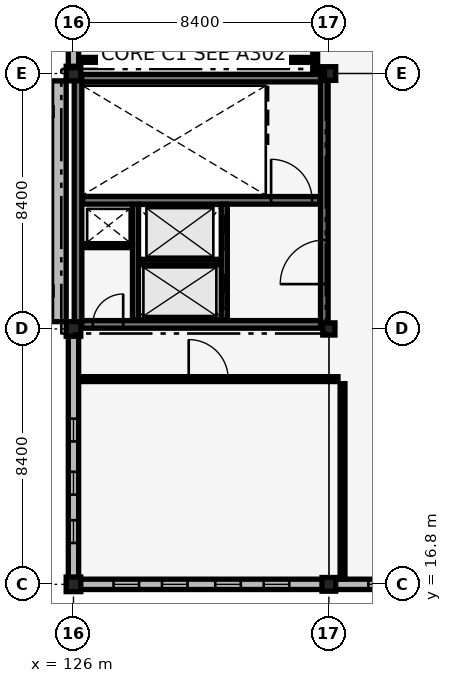
"""IFC4 building model, lengths in metres.
Left out: names, types, materials, properties, quantities, classifications, styles, units other than length and angle.
Written with IfcOpenShell. Run it as: python <this file> out.ifc"""

import sys

from ifc_helpers import new_model, si_unit, direction, frame, frame_2d, origin, origin_2d, place, context, subcontext, project, spatial, rectangle, extrude, element, fill, save


model = new_model("IFC4")
c1 = context("Model", 3, precision=1e-05, world=origin(), true_north=direction((0.0, 1.0)))
c2 = subcontext(c1, "Body", "Model", "MODEL_VIEW")
j1 = project(units=[si_unit("LENGTHUNIT", "METRE"), si_unit("PLANEANGLEUNIT", "RADIAN")], contexts=[c1])
p1 = place(None, origin())
s1 = spatial("IfcSite", under=j1, at=p1, CompositionType="ELEMENT")
p2 = place(p1, origin())
s2 = spatial("IfcBuilding", under=s1, at=p2, CompositionType="ELEMENT")
p3 = place(p2, frame((0.0, 0.0, 26.18)))
s3 = spatial("IfcBuildingStorey", under=s2, at=p3, CompositionType="ELEMENT", Elevation=26.18)
p4 = place(p3, frame((126.15, 25.35, 0.0), z_axis=(0.0, 0.0, 1.0), x_axis=(1.0, 0.0, 0.0)))
e1 = element("IfcWall", 1, at=p4, inside=s3, PredefinedType="SHEAR", context=c2, shape_type="SweptSolid", body=[
    extrude(rectangle(XDim=8.1, YDim=0.25, at=frame_2d((4.05, 0.0))), origin(), (0.0, 0.0, 1.0), 3.84),
])
p5 = place(p4, frame((0.485, 0.0, 0.0)))
e2 = element("IfcOpeningElement", 2, at=p5, cuts=e1, PredefinedType="OPENING", context=c2, shape_type="SweptSolid", body=[
    extrude(rectangle(XDim=1.0, YDim=2.15, at=frame_2d((0.5, 1.075))), frame((0.0, 0.135, 0.0), z_axis=(0.0, -1.0, 0.0), x_axis=(1.0, 0.0, 0.0)), (0.0, 0.0, 1.0), 0.27),
])
p6 = place(p3, frame((126.15, 33.45, 0.0), z_axis=(0.0, 0.0, 1.0), x_axis=(1.0, 0.0, 0.0)))
e3 = element("IfcWall", 3, at=p6, inside=s3, PredefinedType="SHEAR", context=c2, shape_type="SweptSolid", body=[
    extrude(rectangle(XDim=8.1, YDim=0.25, at=frame_2d((4.05, 0.0))), origin(), (0.0, 0.0, 1.0), 3.84),
])
p7 = place(p3, frame((126.15, 25.35, 0.0), z_axis=(0.0, 0.0, 1.0), x_axis=(0.0, 1.0, 0.0)))
e4 = element("IfcWall", 4, at=p7, inside=s3, PredefinedType="SHEAR", context=c2, shape_type="SweptSolid", body=[
    extrude(rectangle(XDim=8.1, YDim=0.25, at=frame_2d((4.05, 0.0))), origin(), (0.0, 0.0, 1.0), 3.84),
])
p8 = place(p3, frame((134.25, 25.35, 0.0), z_axis=(0.0, 0.0, 1.0), x_axis=(0.0, 1.0, 0.0)))
e5 = element("IfcWall", 5, at=p8, inside=s3, PredefinedType="SHEAR", context=c2, shape_type="SweptSolid", body=[
    extrude(rectangle(XDim=8.1, YDim=0.25, at=frame_2d((4.05, 0.0))), origin(), (0.0, 0.0, 1.0), 3.84),
])
p9 = place(p8, frame((1.325, 0.0, 0.0)))
e6 = element("IfcOpeningElement", 6, at=p9, cuts=e5, PredefinedType="OPENING", context=c2, shape_type="SweptSolid", body=[
    extrude(rectangle(XDim=1.45, YDim=2.15, at=frame_2d((0.725, 1.075))), frame((0.0, 0.135, 0.0), z_axis=(0.0, -1.0, 0.0), x_axis=(1.0, 0.0, 0.0)), (0.0, 0.0, 1.0), 0.27),
])
p10 = place(p3, frame((126.3, 29.43, 0.0), z_axis=(0.0, 0.0, 1.0), x_axis=(1.0, 0.0, 0.0)))
e7 = element("IfcWall", 7, at=p10, inside=s3, PredefinedType="SHEAR", context=c2, shape_type="SweptSolid", body=[
    extrude(rectangle(XDim=7.8, YDim=0.25, at=frame_2d((3.9, 0.0))), origin(), (0.0, 0.0, 1.0), 3.84),
])
p11 = place(p10, frame((6.2, 0.0, 0.0)))
e8 = element("IfcOpeningElement", 8, at=p11, cuts=e7, PredefinedType="OPENING", context=c2, shape_type="SweptSolid", body=[
    extrude(rectangle(XDim=1.35, YDim=2.15, at=frame_2d((0.675, 1.075))), frame((0.0, 0.135, 0.0), z_axis=(0.0, -1.0, 0.0), x_axis=(1.0, 0.0, 0.0)), (0.0, 0.0, 1.0), 0.27),
])
for number, where, z_axis, x_axis in (
    (9, (126.0, 16.8, 0.0), (0.0, 0.0, 1.0), (1.0, 0.0, 0.0)),
    (10, (126.0, 25.2, 0.0), (0.0, 0.0, 1.0), (1.0, 0.0, 0.0)),
    (11, (126.0, 33.6, 0.0), (0.0, 0.0, 1.0), (1.0, 0.0, 0.0)),
):
    element("IfcColumn", number, at=place(p3, frame(where, z_axis=z_axis, x_axis=x_axis)), inside=s3, PredefinedType="COLUMN", context=c2, shape_type="SweptSolid", body=[
        extrude(rectangle(XDim=0.48, YDim=0.48, at=origin_2d()), origin(), (0.0, 0.0, 1.0), 3.84),
    ])
p12 = place(p3, frame((134.4, 16.8, 0.0), z_axis=(0.0, 0.0, 1.0), x_axis=(1.0, 0.0, 0.0)))
e12 = element("IfcColumn", 12, at=p12, inside=s3, PredefinedType="COLUMN", context=c2, shape_type="SweptSolid", body=[
    extrude(rectangle(XDim=0.45, YDim=0.45, at=origin_2d()), origin(), (0.0, 0.0, 1.0), 3.84),
])
p13 = place(p3, frame((134.4, 25.2, 0.0), z_axis=(0.0, 0.0, 1.0), x_axis=(1.0, 0.0, 0.0)))
e13 = element("IfcColumn", 13, at=p13, inside=s3, PredefinedType="COLUMN", context=c2, shape_type="SweptSolid", body=[
    extrude(rectangle(XDim=0.4, YDim=0.4, at=origin_2d()), origin(), (0.0, 0.0, 1.0), 3.84),
])
p14 = place(p3, frame((134.4, 33.6, 0.0), z_axis=(0.0, 0.0, 1.0), x_axis=(1.0, 0.0, 0.0)))
e14 = element("IfcColumn", 14, at=p14, inside=s3, PredefinedType="COLUMN", context=c2, shape_type="SweptSolid", body=[
    extrude(rectangle(XDim=0.45, YDim=0.45, at=origin_2d()), origin(), (0.0, 0.0, 1.0), 3.84),
])
p15 = place(p3, frame((126.225, 16.8, 0.0), z_axis=(0.0, 0.0, 1.0), x_axis=(1.0, 0.0, 0.0)))
e15 = element("IfcWall", 15, at=p15, inside=s3, PredefinedType="SOLIDWALL", context=c2, shape_type="SweptSolid", body=[
    extrude(rectangle(XDim=7.965, YDim=0.34, at=frame_2d((3.982, 0.0))), origin(), (0.0, 0.0, 1.0), 3.84),
])
p16 = place(p15, frame((1.093, 0.0, 0.75)))
e16 = element("IfcOpeningElement", 16, at=p16, cuts=e15, PredefinedType="OPENING", context=c2, shape_type="SweptSolid", body=[
    extrude(rectangle(XDim=0.84, YDim=2.85, at=frame_2d((0.42, 1.425))), frame((0.0, 0.18, 0.0), z_axis=(0.0, -1.0, 0.0), x_axis=(1.0, 0.0, 0.0)), (0.0, 0.0, 1.0), 0.36),
])
p17 = place(p15, frame((2.686, 0.0, 0.75)))
e17 = element("IfcOpeningElement", 17, at=p17, cuts=e15, PredefinedType="OPENING", context=c2, shape_type="SweptSolid", body=[
    extrude(rectangle(XDim=0.84, YDim=2.85, at=frame_2d((0.42, 1.425))), frame((0.0, 0.18, 0.0), z_axis=(0.0, -1.0, 0.0), x_axis=(1.0, 0.0, 0.0)), (0.0, 0.0, 1.0), 0.36),
])
p18 = place(p15, frame((4.439, 0.0, 0.75)))
e18 = element("IfcOpeningElement", 18, at=p18, cuts=e15, PredefinedType="OPENING", context=c2, shape_type="SweptSolid", body=[
    extrude(rectangle(XDim=0.84, YDim=2.85, at=frame_2d((0.42, 1.425))), frame((0.0, 0.18, 0.0), z_axis=(0.0, -1.0, 0.0), x_axis=(1.0, 0.0, 0.0)), (0.0, 0.0, 1.0), 0.36),
])
p19 = place(p15, frame((6.032, 0.0, 0.75)))
e19 = element("IfcOpeningElement", 19, at=p19, cuts=e15, PredefinedType="OPENING", context=c2, shape_type="SweptSolid", body=[
    extrude(rectangle(XDim=0.84, YDim=2.85, at=frame_2d((0.42, 1.425))), frame((0.0, 0.18, 0.0), z_axis=(0.0, -1.0, 0.0), x_axis=(1.0, 0.0, 0.0)), (0.0, 0.0, 1.0), 0.36),
])
p20 = place(p3, frame((126.0, 17.025, 0.0), z_axis=(0.0, 0.0, 1.0), x_axis=(0.0, 1.0, 0.0)))
e20 = element("IfcWall", 20, at=p20, inside=s3, PredefinedType="SOLIDWALL", context=c2, shape_type="SweptSolid", body=[
    extrude(rectangle(XDim=7.95, YDim=0.34, at=frame_2d((3.975, 0.0))), origin(), (0.0, 0.0, 1.0), 3.48),
])
p21 = place(p20, frame((1.135, 0.0, 0.75)))
e21 = element("IfcOpeningElement", 21, at=p21, cuts=e20, PredefinedType="OPENING", context=c2, shape_type="SweptSolid", body=[
    extrude(rectangle(XDim=0.75, YDim=2.1, at=frame_2d((0.375, 1.05))), frame((0.0, 0.18, 0.0), z_axis=(0.0, -1.0, 0.0), x_axis=(1.0, 0.0, 0.0)), (0.0, 0.0, 1.0), 0.36),
])
p22 = place(p20, frame((2.726, 0.0, 0.75)))
e22 = element("IfcOpeningElement", 22, at=p22, cuts=e20, PredefinedType="OPENING", context=c2, shape_type="SweptSolid", body=[
    extrude(rectangle(XDim=0.75, YDim=2.1, at=frame_2d((0.375, 1.05))), frame((0.0, 0.18, 0.0), z_axis=(0.0, -1.0, 0.0), x_axis=(1.0, 0.0, 0.0)), (0.0, 0.0, 1.0), 0.36),
])
p23 = place(p20, frame((4.475, 0.0, 0.75)))
e23 = element("IfcOpeningElement", 23, at=p23, cuts=e20, PredefinedType="OPENING", context=c2, shape_type="SweptSolid", body=[
    extrude(rectangle(XDim=0.75, YDim=2.1, at=frame_2d((0.375, 1.05))), frame((0.0, 0.18, 0.0), z_axis=(0.0, -1.0, 0.0), x_axis=(1.0, 0.0, 0.0)), (0.0, 0.0, 1.0), 0.36),
])
p24 = place(p3, frame((125.52, 25.44, 0.0), z_axis=(0.0, 0.0, 1.0), x_axis=(0.0, 1.0, 0.0)))
e24 = element("IfcWall", 24, at=p24, inside=s3, PredefinedType="SOLIDWALL", context=c2, shape_type="SweptSolid", body=[
    extrude(rectangle(XDim=7.92, YDim=0.48, at=frame_2d((3.96, 0.0))), origin(), (0.0, 0.0, 1.0), 4.08),
])
p25 = place(p3, frame((126.0, 33.825, 0.0), z_axis=(0.0, 0.0, 1.0), x_axis=(0.0, 1.0, 0.0)))
e25 = element("IfcWall", 25, at=p25, inside=s3, PredefinedType="SOLIDWALL", context=c2, shape_type="SweptSolid", body=[
    extrude(rectangle(XDim=7.95, YDim=0.34, at=frame_2d((3.975, 0.0))), origin(), (0.0, 0.0, 1.0), 3.48),
])
p26 = place(p25, frame((1.135, 0.0, 0.75)))
e26 = element("IfcOpeningElement", 26, at=p26, cuts=e25, PredefinedType="OPENING", context=c2, shape_type="SweptSolid", body=[
    extrude(rectangle(XDim=0.75, YDim=2.1, at=frame_2d((0.375, 1.05))), frame((0.0, 0.18, 0.0), z_axis=(0.0, -1.0, 0.0), x_axis=(1.0, 0.0, 0.0)), (0.0, 0.0, 1.0), 0.36),
])
p27 = place(p25, frame((2.726, 0.0, 0.75)))
e27 = element("IfcOpeningElement", 27, at=p27, cuts=e25, PredefinedType="OPENING", context=c2, shape_type="SweptSolid", body=[
    extrude(rectangle(XDim=0.75, YDim=2.1, at=frame_2d((0.375, 1.05))), frame((0.0, 0.18, 0.0), z_axis=(0.0, -1.0, 0.0), x_axis=(1.0, 0.0, 0.0)), (0.0, 0.0, 1.0), 0.36),
])
p28 = place(p25, frame((4.475, 0.0, 0.75)))
e28 = element("IfcOpeningElement", 28, at=p28, cuts=e25, PredefinedType="OPENING", context=c2, shape_type="SweptSolid", body=[
    extrude(rectangle(XDim=0.75, YDim=2.1, at=frame_2d((0.375, 1.05))), frame((0.0, 0.18, 0.0), z_axis=(0.0, -1.0, 0.0), x_axis=(1.0, 0.0, 0.0)), (0.0, 0.0, 1.0), 0.36),
])
p29 = place(p25, frame((6.064, 0.0, 0.75)))
e29 = element("IfcOpeningElement", 29, at=p29, cuts=e25, PredefinedType="OPENING", context=c2, shape_type="SweptSolid", body=[
    extrude(rectangle(XDim=0.75, YDim=2.1, at=frame_2d((0.375, 1.05))), frame((0.0, 0.18, 0.0), z_axis=(0.0, -1.0, 0.0), x_axis=(1.0, 0.0, 0.0)), (0.0, 0.0, 1.0), 0.36),
])
p30 = place(p3, frame((134.61, 16.8, 0.0), z_axis=(0.0, 0.0, 1.0), x_axis=(1.0, 0.0, 0.0)))
e30 = element("IfcWall", 30, at=p30, inside=s3, PredefinedType="SOLIDWALL", context=c2, shape_type="SweptSolid", body=[
    extrude(rectangle(XDim=7.995, YDim=0.34, at=frame_2d((3.998, 0.0))), origin(), (0.0, 0.0, 1.0), 3.84),
])
p31 = place(p30, frame((1.089, 0.0, 0.75)))
e31 = element("IfcOpeningElement", 31, at=p31, cuts=e30, PredefinedType="OPENING", context=c2, shape_type="SweptSolid", body=[
    extrude(rectangle(XDim=0.86, YDim=2.6, at=frame_2d((0.43, 1.3))), frame((0.0, 0.18, 0.0), z_axis=(0.0, -1.0, 0.0), x_axis=(1.0, 0.0, 0.0)), (0.0, 0.0, 1.0), 0.36),
])
p32 = place(p30, frame((4.447, 0.0, 0.75)))
e32 = element("IfcOpeningElement", 32, at=p32, cuts=e30, PredefinedType="OPENING", context=c2, shape_type="SweptSolid", body=[
    extrude(rectangle(XDim=0.86, YDim=2.6, at=frame_2d((0.43, 1.3))), frame((0.0, 0.18, 0.0), z_axis=(0.0, -1.0, 0.0), x_axis=(1.0, 0.0, 0.0)), (0.0, 0.0, 1.0), 0.36),
])
p33 = place(p30, frame((6.046, 0.0, 0.75)))
e33 = element("IfcOpeningElement", 33, at=p33, cuts=e30, PredefinedType="OPENING", context=c2, shape_type="SweptSolid", body=[
    extrude(rectangle(XDim=0.86, YDim=2.6, at=frame_2d((0.43, 1.3))), frame((0.0, 0.18, 0.0), z_axis=(0.0, -1.0, 0.0), x_axis=(1.0, 0.0, 0.0)), (0.0, 0.0, 1.0), 0.36),
])
p34 = place(p3, frame((130.96, 25.5, 0.0), z_axis=(0.0, 0.0, 1.0), x_axis=(0.0, 1.0, 0.0)))
e34 = element("IfcWall", 34, at=p34, inside=s3, PredefinedType="SHEAR", context=c2, shape_type="SweptSolid", body=[
    extrude(rectangle(XDim=3.8, YDim=0.2, at=frame_2d((1.9, 0.0))), origin(), (0.0, 0.0, 1.0), 3.84),
])
p35 = place(p34, frame((0.375, 0.0, 0.0)))
e35 = element("IfcOpeningElement", 35, at=p35, cuts=e34, PredefinedType="OPENING", context=c2, shape_type="SweptSolid", body=[
    extrude(rectangle(XDim=1.1, YDim=2.15, at=frame_2d((0.55, 1.075))), frame((0.0, 0.11, 0.0), z_axis=(0.0, -1.0, 0.0), x_axis=(1.0, 0.0, 0.0)), (0.0, 0.0, 1.0), 0.22),
])
p36 = place(p34, frame((2.325, 0.0, 0.0)))
e36 = element("IfcOpeningElement", 36, at=p36, cuts=e34, PredefinedType="OPENING", context=c2, shape_type="SweptSolid", body=[
    extrude(rectangle(XDim=1.1, YDim=2.15, at=frame_2d((0.55, 1.075))), frame((0.0, 0.11, 0.0), z_axis=(0.0, -1.0, 0.0), x_axis=(1.0, 0.0, 0.0)), (0.0, 0.0, 1.0), 0.22),
])
p37 = place(p3, frame((128.04, 25.5, 0.0), z_axis=(0.0, 0.0, 1.0), x_axis=(0.0, 1.0, 0.0)))
e37 = element("IfcWall", 37, at=p37, inside=s3, PredefinedType="SHEAR", context=c2, shape_type="SweptSolid", body=[
    extrude(rectangle(XDim=3.8, YDim=0.2, at=frame_2d((1.9, 0.0))), origin(), (0.0, 0.0, 1.0), 3.84),
])
p38 = place(p3, frame((128.15, 27.4, 0.0), z_axis=(0.0, 0.0, 1.0), x_axis=(1.0, 0.0, 0.0)))
e38 = element("IfcWall", 38, at=p38, inside=s3, PredefinedType="SHEAR", context=c2, shape_type="SweptSolid", body=[
    extrude(rectangle(XDim=2.7, YDim=0.18, at=frame_2d((1.35, 0.0))), origin(), (0.0, 0.0, 1.0), 3.84),
])
p39 = place(p3, frame((126.32, 27.94, 0.0), z_axis=(0.0, 0.0, 1.0), x_axis=(1.0, 0.0, 0.0)))
e39 = element("IfcWall", 39, at=p39, inside=s3, PredefinedType="PARTITIONING", context=c2, shape_type="SweptSolid", body=[
    extrude(rectangle(XDim=1.62, YDim=0.13, at=frame_2d((0.81, 0.0))), origin(), (0.0, 0.0, 1.0), 3.84),
])
p40 = place(p3, frame((133.95, 33.63, 0.0), z_axis=(0.0, 0.0, 1.0), x_axis=(0.0, 1.0, 0.0)))
e40 = element("IfcWall", 40, at=p40, inside=s3, PredefinedType="PARTITIONING", context=c2, shape_type="SweptSolid", body=[
    extrude(rectangle(XDim=50.34, YDim=0.16, at=frame_2d((25.17, 0.0))), origin(), (0.0, 0.0, 1.0), 3.84),
])
p41 = place(p40, frame((9.808, 0.0, 0.0)))
e41 = element("IfcOpeningElement", 41, at=p41, cuts=e40, PredefinedType="OPENING", context=c2, shape_type="SweptSolid", body=[
    extrude(rectangle(XDim=1.3, YDim=2.2, at=frame_2d((0.65, 1.1))), frame((0.0, 0.09, 0.0), z_axis=(0.0, -1.0, 0.0), x_axis=(1.0, 0.0, 0.0)), (0.0, 0.0, 1.0), 0.18),
])
p42 = place(p3, frame((126.18, 34.05, 0.0), z_axis=(0.0, 0.0, 1.0), x_axis=(1.0, 0.0, 0.0)))
e42 = element("IfcWall", 42, at=p42, inside=s3, PredefinedType="PARTITIONING", context=c2, shape_type="SweptSolid", body=[
    extrude(rectangle(XDim=7.62, YDim=0.16, at=frame_2d((3.81, 0.0))), origin(), (0.0, 0.0, 1.0), 3.48),
])
p43 = place(p3, frame((126.18, 23.55, 0.0), z_axis=(0.0, 0.0, 1.0), x_axis=(1.0, 0.0, 0.0)))
e43 = element("IfcWall", 43, at=p43, inside=s3, PredefinedType="PARTITIONING", context=c2, shape_type="SweptSolid", body=[
    extrude(rectangle(XDim=8.52, YDim=0.16, at=frame_2d((4.26, 0.0))), origin(), (0.0, 0.0, 1.0), 3.48),
])
p44 = place(p43, frame((3.61, 0.0, 0.0)))
e44 = element("IfcOpeningElement", 44, at=p44, cuts=e43, PredefinedType="OPENING", context=c2, shape_type="SweptSolid", body=[
    extrude(rectangle(XDim=1.3, YDim=2.2, at=frame_2d((0.65, 1.1))), frame((0.0, 0.09, 0.0), z_axis=(0.0, -1.0, 0.0), x_axis=(1.0, 0.0, 0.0)), (0.0, 0.0, 1.0), 0.18),
])
p45 = place(p3, frame((134.85, 16.98, 0.0), z_axis=(0.0, 0.0, 1.0), x_axis=(0.0, 1.0, 0.0)))
e45 = element("IfcWall", 45, at=p45, inside=s3, PredefinedType="PARTITIONING", context=c2, shape_type="SweptSolid", body=[
    extrude(rectangle(XDim=6.42, YDim=0.16, at=frame_2d((3.21, 0.0))), origin(), (0.0, 0.0, 1.0), 3.84),
])
p46 = place(p16, origin())
e46 = element("IfcWindow", 46, at=p46, inside=s3, PartitioningType="DOUBLE_PANEL_VERTICAL", PredefinedType="WINDOW", context=c2, shape_type="SweptSolid", body=[
    extrude(rectangle(XDim=0.84, YDim=2.85, at=frame_2d((0.42, 1.425))), frame((0.0, 0.03, 0.0), z_axis=(0.0, -1.0, 0.0), x_axis=(1.0, 0.0, 0.0)), (0.0, 0.0, 1.0), 0.06),
])
fill(e16, e46)
p47 = place(p17, origin())
e47 = element("IfcWindow", 47, at=p47, inside=s3, PartitioningType="DOUBLE_PANEL_VERTICAL", PredefinedType="WINDOW", context=c2, shape_type="SweptSolid", body=[
    extrude(rectangle(XDim=0.84, YDim=2.85, at=frame_2d((0.42, 1.425))), frame((0.0, 0.03, 0.0), z_axis=(0.0, -1.0, 0.0), x_axis=(1.0, 0.0, 0.0)), (0.0, 0.0, 1.0), 0.06),
])
fill(e17, e47)
p48 = place(p18, origin())
e48 = element("IfcWindow", 48, at=p48, inside=s3, PartitioningType="DOUBLE_PANEL_VERTICAL", PredefinedType="WINDOW", context=c2, shape_type="SweptSolid", body=[
    extrude(rectangle(XDim=0.84, YDim=2.85, at=frame_2d((0.42, 1.425))), frame((0.0, 0.03, 0.0), z_axis=(0.0, -1.0, 0.0), x_axis=(1.0, 0.0, 0.0)), (0.0, 0.0, 1.0), 0.06),
])
fill(e18, e48)
p49 = place(p19, origin())
e49 = element("IfcWindow", 49, at=p49, inside=s3, PartitioningType="DOUBLE_PANEL_VERTICAL", PredefinedType="WINDOW", context=c2, shape_type="SweptSolid", body=[
    extrude(rectangle(XDim=0.84, YDim=2.85, at=frame_2d((0.42, 1.425))), frame((0.0, 0.03, 0.0), z_axis=(0.0, -1.0, 0.0), x_axis=(1.0, 0.0, 0.0)), (0.0, 0.0, 1.0), 0.06),
])
fill(e19, e49)
p50 = place(p21, origin())
e50 = element("IfcWindow", 50, at=p50, inside=s3, PartitioningType="DOUBLE_PANEL_VERTICAL", PredefinedType="WINDOW", context=c2, shape_type="SweptSolid", body=[
    extrude(rectangle(XDim=0.75, YDim=2.1, at=frame_2d((0.375, 1.05))), frame((0.0, 0.03, 0.0), z_axis=(0.0, -1.0, 0.0), x_axis=(1.0, 0.0, 0.0)), (0.0, 0.0, 1.0), 0.06),
])
fill(e21, e50)
p51 = place(p22, origin())
e51 = element("IfcWindow", 51, at=p51, inside=s3, PartitioningType="DOUBLE_PANEL_VERTICAL", PredefinedType="WINDOW", context=c2, shape_type="SweptSolid", body=[
    extrude(rectangle(XDim=0.75, YDim=2.1, at=frame_2d((0.375, 1.05))), frame((0.0, 0.03, 0.0), z_axis=(0.0, -1.0, 0.0), x_axis=(1.0, 0.0, 0.0)), (0.0, 0.0, 1.0), 0.06),
])
fill(e22, e51)
p52 = place(p23, origin())
e52 = element("IfcWindow", 52, at=p52, inside=s3, PartitioningType="DOUBLE_PANEL_VERTICAL", PredefinedType="WINDOW", context=c2, shape_type="SweptSolid", body=[
    extrude(rectangle(XDim=0.75, YDim=2.1, at=frame_2d((0.375, 1.05))), frame((0.0, 0.03, 0.0), z_axis=(0.0, -1.0, 0.0), x_axis=(1.0, 0.0, 0.0)), (0.0, 0.0, 1.0), 0.06),
])
fill(e23, e52)
p53 = place(p31, origin())
e53 = element("IfcWindow", 53, at=p53, inside=s3, PartitioningType="DOUBLE_PANEL_VERTICAL", PredefinedType="WINDOW", context=c2, shape_type="SweptSolid", body=[
    extrude(rectangle(XDim=0.86, YDim=2.6, at=frame_2d((0.43, 1.3))), frame((0.0, 0.03, 0.0), z_axis=(0.0, -1.0, 0.0), x_axis=(1.0, 0.0, 0.0)), (0.0, 0.0, 1.0), 0.06),
])
fill(e31, e53)
p54 = place(p11, origin())
e54 = element("IfcDoor", 54, at=p54, inside=s3, OperationType="SINGLE_SWING_LEFT", PredefinedType="DOOR", context=c2, shape_type="SweptSolid", body=[
    extrude(rectangle(XDim=1.35, YDim=2.15, at=frame_2d((0.675, 1.075))), frame((0.0, 0.025, 0.0), z_axis=(0.0, -1.0, 0.0), x_axis=(1.0, 0.0, 0.0)), (0.0, 0.0, 1.0), 0.05),
])
fill(e8, e54)
p55 = place(p35, origin())
e55 = element("IfcDoor", 55, at=p55, inside=s3, OperationType="SLIDING_TO_LEFT", PredefinedType="DOOR", context=c2, shape_type="SweptSolid", body=[
    extrude(rectangle(XDim=1.1, YDim=2.15, at=frame_2d((0.55, 1.075))), frame((0.0, 0.025, 0.0), z_axis=(0.0, -1.0, 0.0), x_axis=(1.0, 0.0, 0.0)), (0.0, 0.0, 1.0), 0.05),
])
fill(e35, e55)
p56 = place(p36, origin())
e56 = element("IfcDoor", 56, at=p56, inside=s3, OperationType="SLIDING_TO_LEFT", PredefinedType="DOOR", context=c2, shape_type="SweptSolid", body=[
    extrude(rectangle(XDim=1.1, YDim=2.15, at=frame_2d((0.55, 1.075))), frame((0.0, 0.025, 0.0), z_axis=(0.0, -1.0, 0.0), x_axis=(1.0, 0.0, 0.0)), (0.0, 0.0, 1.0), 0.05),
])
fill(e36, e56)
p57 = place(p9, origin())
e57 = element("IfcDoor", 57, at=p57, inside=s3, OperationType="DOUBLE_DOOR_SINGLE_SWING", PredefinedType="DOOR", context=c2, shape_type="SweptSolid", body=[
    extrude(rectangle(XDim=1.45, YDim=2.15, at=frame_2d((0.725, 1.075))), frame((0.0, 0.025, 0.0), z_axis=(0.0, -1.0, 0.0), x_axis=(1.0, 0.0, 0.0)), (0.0, 0.0, 1.0), 0.05),
])
fill(e6, e57)
p58 = place(p5, origin())
e58 = element("IfcDoor", 58, at=p58, inside=s3, OperationType="SINGLE_SWING_RIGHT", PredefinedType="DOOR", context=c2, shape_type="SweptSolid", body=[
    extrude(rectangle(XDim=1.0, YDim=2.15, at=frame_2d((0.5, 1.075))), frame((0.0, 0.025, 0.0), z_axis=(0.0, -1.0, 0.0), x_axis=(1.0, 0.0, 0.0)), (0.0, 0.0, 1.0), 0.05),
])
fill(e2, e58)
p59 = place(p44, origin())
e59 = element("IfcDoor", 59, at=p59, inside=s3, OperationType="SINGLE_SWING_LEFT", PredefinedType="DOOR", context=c2, shape_type="SweptSolid", body=[
    extrude(rectangle(XDim=1.3, YDim=2.2, at=frame_2d((0.65, 1.1))), frame((0.0, 0.025, 0.0), z_axis=(0.0, -1.0, 0.0), x_axis=(1.0, 0.0, 0.0)), (0.0, 0.0, 1.0), 0.05),
])
fill(e44, e59)
save(model, sys.argv[1])
